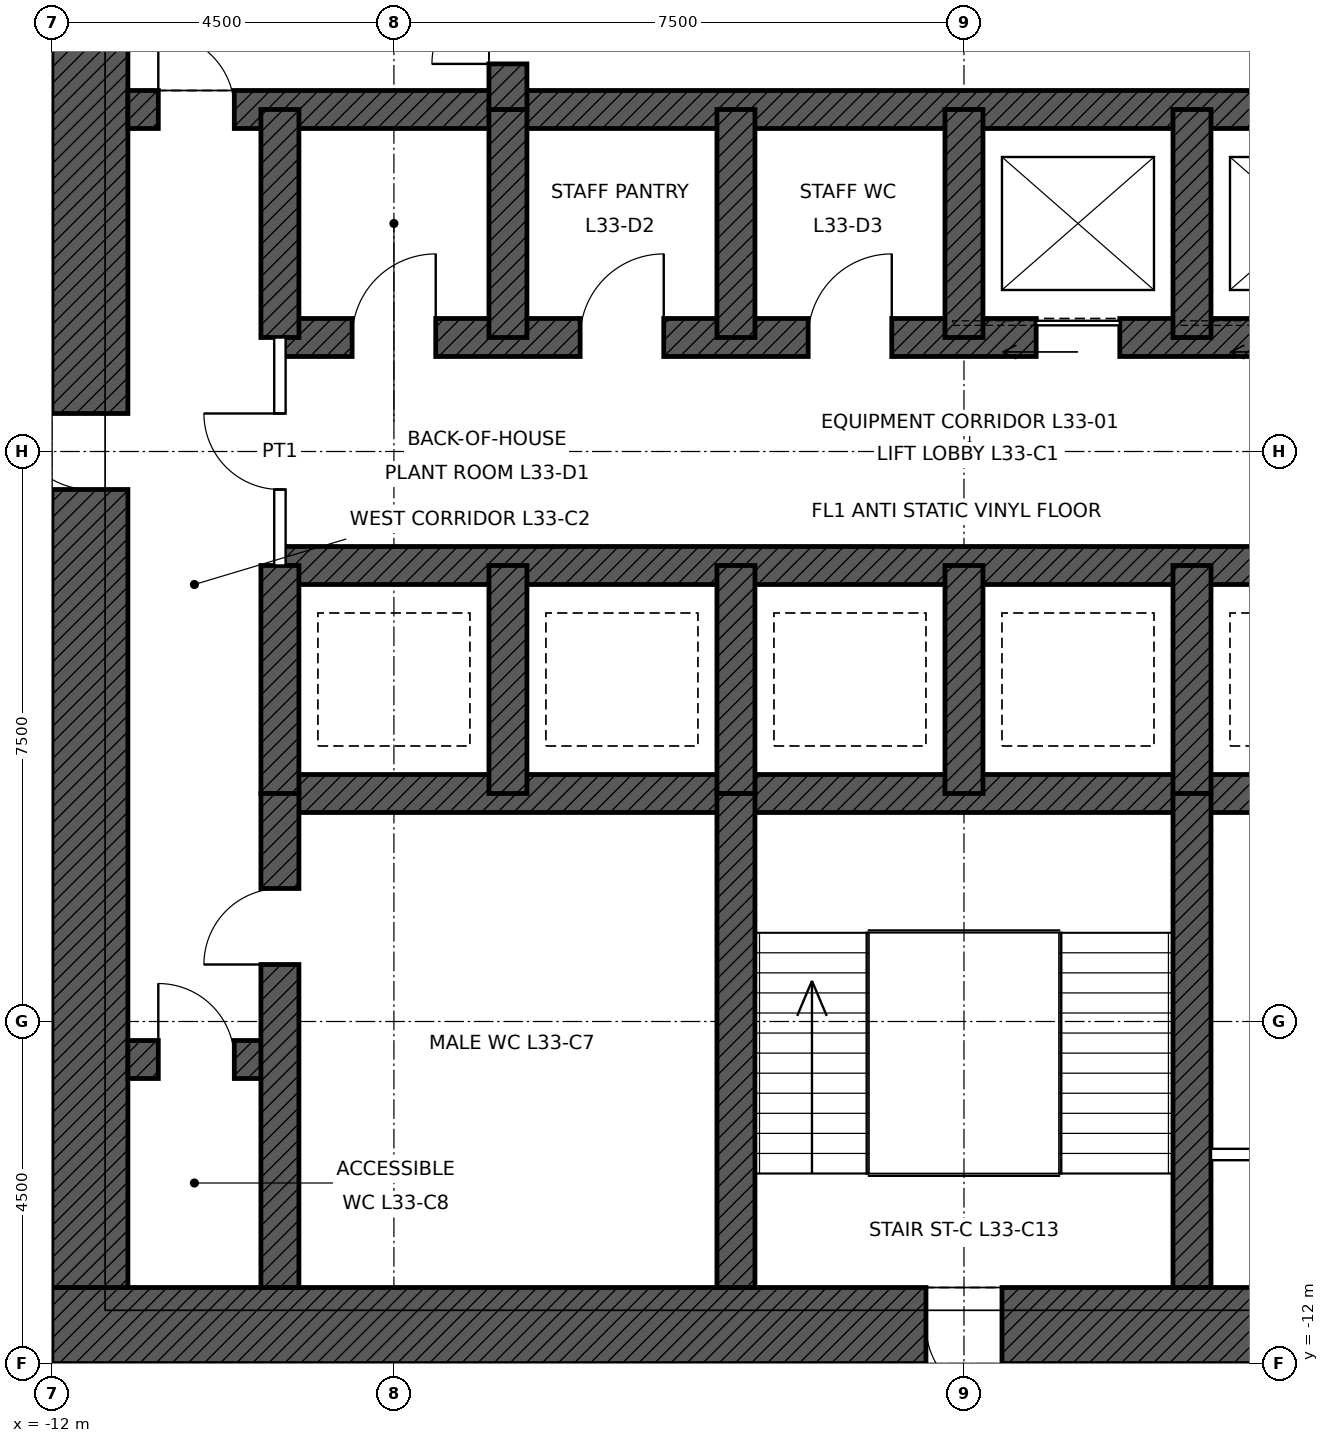
"""IFC4 building model, lengths in metres.
Left out: names, types, materials, properties, quantities, classifications, styles, units other than length and angle.
Written with IfcOpenShell. Run it as: python <this file> out.ifc"""

import sys

from ifc_helpers import new_model, si_unit, direction, frame, frame_2d, origin, place, context, subcontext, project, spatial, rectangle, extrude, element, fill, save


model = new_model("IFC4")
c1 = context("Model", 3, precision=1e-05, world=origin(), true_north=direction((0.0, 1.0)))
c2 = subcontext(c1, "Body", "Model", "MODEL_VIEW")
j1 = project(units=[si_unit("LENGTHUNIT", "METRE"), si_unit("PLANEANGLEUNIT", "RADIAN")], contexts=[c1])
p1 = place(None, origin())
s1 = spatial("IfcSite", under=j1, at=p1, CompositionType="ELEMENT")
p2 = place(p1, origin())
s2 = spatial("IfcBuilding", under=s1, at=p2, CompositionType="ELEMENT")
p3 = place(p2, frame((0.0, 0.0, 162.9)))
s3 = spatial("IfcBuildingStorey", under=s2, at=p3, CompositionType="ELEMENT", Elevation=162.9)
p4 = place(p3, frame((12.0, -11.5, 0.0), z_axis=(0.0, 0.0, 1.0), x_axis=(-1.0, 0.0, 0.0)))
e1 = element("IfcWall", 1, at=p4, inside=s3, PredefinedType="SHEAR", context=c2, shape_type="SweptSolid", body=[
    extrude(rectangle(XDim=24.0, YDim=1.0, at=frame_2d((12.0, 0.0))), origin(), (0.0, 0.0, 1.0), 4.5),
])
p5 = place(p4, frame((11.5, 0.0, 0.0)))
e2 = element("IfcOpeningElement", 2, at=p5, cuts=e1, PredefinedType="OPENING", context=c2, shape_type="SweptSolid", body=[
    extrude(rectangle(XDim=1.0, YDim=2.1, at=frame_2d((0.5, 1.05))), frame((0.0, 0.51, 0.0), z_axis=(0.0, -1.0, 0.0), x_axis=(1.0, 0.0, 0.0)), (0.0, 0.0, 1.0), 1.02),
])
p6 = place(p4, frame((1.0, 0.0, 0.0)))
e3 = element("IfcOpeningElement", 3, at=p6, cuts=e1, PredefinedType="OPENING", context=c2, shape_type="SweptSolid", body=[
    extrude(rectangle(XDim=1.0, YDim=2.4, at=frame_2d((0.5, 1.2))), frame((0.0, 0.51, 0.0), z_axis=(0.0, -1.0, 0.0), x_axis=(1.0, 0.0, 0.0)), (0.0, 0.0, 1.0), 1.02),
])
p7 = place(p3, frame((-11.5, -11.0, 0.0), z_axis=(0.0, 0.0, 1.0), x_axis=(0.0, 1.0, 0.0)))
e4 = element("IfcWall", 4, at=p7, inside=s3, PredefinedType="SHEAR", context=c2, shape_type="SweptSolid", body=[
    extrude(rectangle(XDim=22.0, YDim=1.0, at=frame_2d((11.0, 0.0))), origin(), (0.0, 0.0, 1.0), 4.5),
])
p8 = place(p7, frame((10.5, 0.0, 0.0)))
e5 = element("IfcOpeningElement", 5, at=p8, cuts=e4, PredefinedType="OPENING", context=c2, shape_type="SweptSolid", body=[
    extrude(rectangle(XDim=1.0, YDim=2.4, at=frame_2d((0.5, 1.2))), frame((0.0, 0.51, 0.0), z_axis=(0.0, -1.0, 0.0), x_axis=(1.0, 0.0, 0.0)), (0.0, 0.0, 1.0), 1.02),
])
p9 = place(p3, frame((-11.0, 4.5, 0.0), z_axis=(0.0, 0.0, 1.0), x_axis=(1.0, 0.0, 0.0)))
e6 = element("IfcWall", 6, at=p9, inside=s3, PredefinedType="SHEAR", context=c2, shape_type="SweptSolid", body=[
    extrude(rectangle(XDim=22.0, YDim=0.5, at=frame_2d((11.0, 0.0))), origin(), (0.0, 0.0, 1.0), 4.5),
])
p10 = place(p9, frame((0.4, 0.0, 0.0)))
e7 = element("IfcOpeningElement", 7, at=p10, cuts=e6, PredefinedType="OPENING", context=c2, shape_type="SweptSolid", body=[
    extrude(rectangle(XDim=1.0, YDim=2.1, at=frame_2d((0.5, 1.05))), frame((0.0, 0.26, 0.0), z_axis=(0.0, -1.0, 0.0), x_axis=(1.0, 0.0, 0.0)), (0.0, 0.0, 1.0), 0.52),
])
p11 = place(p9, frame((20.6, 0.0, 0.0)))
e8 = element("IfcOpeningElement", 8, at=p11, cuts=e6, PredefinedType="OPENING", context=c2, shape_type="SweptSolid", body=[
    extrude(rectangle(XDim=1.0, YDim=2.1, at=frame_2d((0.5, 1.05))), frame((0.0, 0.26, 0.0), z_axis=(0.0, -1.0, 0.0), x_axis=(1.0, 0.0, 0.0)), (0.0, 0.0, 1.0), 0.52),
])
p12 = place(p3, frame((-9.0, 1.5, 0.0), z_axis=(0.0, 0.0, 1.0), x_axis=(1.0, 0.0, 0.0)))
e9 = element("IfcWall", 9, at=p12, inside=s3, PredefinedType="SHEAR", context=c2, shape_type="SweptSolid", body=[
    extrude(rectangle(XDim=18.0, YDim=0.5, at=frame_2d((9.0, 0.0))), origin(), (0.0, 0.0, 1.0), 4.5),
])
p13 = place(p12, frame((9.95, 0.0, 0.0)))
e10 = element("IfcOpeningElement", 10, at=p13, cuts=e9, PredefinedType="OPENING", context=c2, shape_type="SweptSolid", body=[
    extrude(rectangle(XDim=1.1, YDim=2.1, at=frame_2d((0.55, 1.05))), frame((0.0, 0.26, 0.0), z_axis=(0.0, -1.0, 0.0), x_axis=(1.0, 0.0, 0.0)), (0.0, 0.0, 1.0), 0.52),
])
p14 = place(p12, frame((12.95, 0.0, 0.0)))
e11 = element("IfcOpeningElement", 11, at=p14, cuts=e9, PredefinedType="OPENING", context=c2, shape_type="SweptSolid", body=[
    extrude(rectangle(XDim=1.1, YDim=2.1, at=frame_2d((0.55, 1.05))), frame((0.0, 0.26, 0.0), z_axis=(0.0, -1.0, 0.0), x_axis=(1.0, 0.0, 0.0)), (0.0, 0.0, 1.0), 0.52),
])
p15 = place(p12, frame((15.95, 0.0, 0.0)))
e12 = element("IfcOpeningElement", 12, at=p15, cuts=e9, PredefinedType="OPENING", context=c2, shape_type="SweptSolid", body=[
    extrude(rectangle(XDim=1.1, YDim=2.1, at=frame_2d((0.55, 1.05))), frame((0.0, 0.26, 0.0), z_axis=(0.0, -1.0, 0.0), x_axis=(1.0, 0.0, 0.0)), (0.0, 0.0, 1.0), 0.52),
])
p16 = place(p12, frame((0.95, 0.0, 0.0)))
e13 = element("IfcOpeningElement", 13, at=p16, cuts=e9, PredefinedType="OPENING", context=c2, shape_type="SweptSolid", body=[
    extrude(rectangle(XDim=1.1, YDim=2.1, at=frame_2d((0.55, 1.05))), frame((0.0, 0.26, 0.0), z_axis=(0.0, -1.0, 0.0), x_axis=(1.0, 0.0, 0.0)), (0.0, 0.0, 1.0), 0.52),
])
p17 = place(p12, frame((3.95, 0.0, 0.0)))
e14 = element("IfcOpeningElement", 14, at=p17, cuts=e9, PredefinedType="OPENING", context=c2, shape_type="SweptSolid", body=[
    extrude(rectangle(XDim=1.1, YDim=2.1, at=frame_2d((0.55, 1.05))), frame((0.0, 0.26, 0.0), z_axis=(0.0, -1.0, 0.0), x_axis=(1.0, 0.0, 0.0)), (0.0, 0.0, 1.0), 0.52),
])
p18 = place(p12, frame((6.95, 0.0, 0.0)))
e15 = element("IfcOpeningElement", 15, at=p18, cuts=e9, PredefinedType="OPENING", context=c2, shape_type="SweptSolid", body=[
    extrude(rectangle(XDim=1.1, YDim=2.1, at=frame_2d((0.55, 1.05))), frame((0.0, 0.26, 0.0), z_axis=(0.0, -1.0, 0.0), x_axis=(1.0, 0.0, 0.0)), (0.0, 0.0, 1.0), 0.52),
])
for number, where, z_axis, x_axis in (
    (16, (-9.0, -1.5, 0.0), (0.0, 0.0, 1.0), (1.0, 0.0, 0.0)),
    (17, (-9.0, -4.5, 0.0), (0.0, 0.0, 1.0), (1.0, 0.0, 0.0)),
):
    element("IfcWall", number, at=place(p3, frame(where, z_axis=z_axis, x_axis=x_axis)), inside=s3, PredefinedType="SHEAR", context=c2, shape_type="SweptSolid", body=[
        extrude(rectangle(XDim=18.0, YDim=0.5, at=frame_2d((9.0, 0.0))), origin(), (0.0, 0.0, 1.0), 4.5),
    ])
p19 = place(p3, frame((-11.0, -8.0, 0.0), z_axis=(0.0, 0.0, 1.0), x_axis=(1.0, 0.0, 0.0)))
e18 = element("IfcWall", 18, at=p19, inside=s3, PredefinedType="SHEAR", context=c2, shape_type="SweptSolid", body=[
    extrude(rectangle(XDim=2.0, YDim=0.5, at=frame_2d((1.0, 0.0))), origin(), (0.0, 0.0, 1.0), 4.5),
])
p20 = place(p19, frame((0.4, 0.0, 0.0)))
e19 = element("IfcOpeningElement", 19, at=p20, cuts=e18, PredefinedType="OPENING", context=c2, shape_type="SweptSolid", body=[
    extrude(rectangle(XDim=1.0, YDim=2.1, at=frame_2d((0.5, 1.05))), frame((0.0, 0.26, 0.0), z_axis=(0.0, -1.0, 0.0), x_axis=(1.0, 0.0, 0.0)), (0.0, 0.0, 1.0), 0.52),
])
for number, where, z_axis, x_axis in (
    (20, (-9.0, 1.5, 0.0), (0.0, 0.0, 1.0), (0.0, 1.0, 0.0)),
    (21, (-9.0, -4.5, 0.0), (0.0, 0.0, 1.0), (0.0, 1.0, 0.0)),
    (22, (-6.0, 1.5, 0.0), (0.0, 0.0, 1.0), (0.0, 1.0, 0.0)),
    (23, (-3.0, 1.5, 0.0), (0.0, 0.0, 1.0), (0.0, 1.0, 0.0)),
    (24, (0.0, 1.5, 0.0), (0.0, 0.0, 1.0), (0.0, 1.0, 0.0)),
    (25, (3.0, 1.5, 0.0), (0.0, 0.0, 1.0), (0.0, 1.0, 0.0)),
    (26, (-6.0, -4.5, 0.0), (0.0, 0.0, 1.0), (0.0, 1.0, 0.0)),
    (27, (-3.0, -4.5, 0.0), (0.0, 0.0, 1.0), (0.0, 1.0, 0.0)),
    (28, (0.0, -4.5, 0.0), (0.0, 0.0, 1.0), (0.0, 1.0, 0.0)),
    (29, (3.0, -4.5, 0.0), (0.0, 0.0, 1.0), (0.0, 1.0, 0.0)),
):
    element("IfcWall", number, at=place(p3, frame(where, z_axis=z_axis, x_axis=x_axis)), inside=s3, PredefinedType="SHEAR", context=c2, shape_type="SweptSolid", body=[
        extrude(rectangle(XDim=3.0, YDim=0.5, at=frame_2d((1.5, 0.0))), origin(), (0.0, 0.0, 1.0), 4.5),
    ])
p21 = place(p3, frame((-6.0, 4.5, 0.0), z_axis=(0.0, 0.0, 1.0), x_axis=(0.0, 1.0, 0.0)))
e30 = element("IfcWall", 30, at=p21, inside=s3, PredefinedType="SHEAR", context=c2, shape_type="SweptSolid", body=[
    extrude(rectangle(XDim=6.5, YDim=0.5, at=frame_2d((3.25, 0.0))), origin(), (0.0, 0.0, 1.0), 4.5),
])
p22 = place(p21, frame((0.6, 0.0, 0.0)))
e31 = element("IfcOpeningElement", 31, at=p22, cuts=e30, PredefinedType="OPENING", context=c2, shape_type="SweptSolid", body=[
    extrude(rectangle(XDim=1.0, YDim=2.1, at=frame_2d((0.5, 1.05))), frame((0.0, 0.26, 0.0), z_axis=(0.0, -1.0, 0.0), x_axis=(1.0, 0.0, 0.0)), (0.0, 0.0, 1.0), 0.52),
])
p23 = place(p3, frame((-9.0, -11.0, 0.0), z_axis=(0.0, 0.0, 1.0), x_axis=(0.0, 1.0, 0.0)))
e32 = element("IfcWall", 32, at=p23, inside=s3, PredefinedType="SHEAR", context=c2, shape_type="SweptSolid", body=[
    extrude(rectangle(XDim=6.5, YDim=0.5, at=frame_2d((3.25, 0.0))), origin(), (0.0, 0.0, 1.0), 4.5),
])
p24 = place(p23, frame((4.25, 0.0, 0.0)))
e33 = element("IfcOpeningElement", 33, at=p24, cuts=e32, PredefinedType="OPENING", context=c2, shape_type="SweptSolid", body=[
    extrude(rectangle(XDim=1.0, YDim=2.1, at=frame_2d((0.5, 1.05))), frame((0.0, 0.26, 0.0), z_axis=(0.0, -1.0, 0.0), x_axis=(1.0, 0.0, 0.0)), (0.0, 0.0, 1.0), 0.52),
])
for number, where, z_axis, x_axis in (
    (34, (-3.0, -11.0, 0.0), (0.0, 0.0, 1.0), (0.0, 1.0, 0.0)),
    (35, (3.0, -11.0, 0.0), (0.0, 0.0, 1.0), (0.0, 1.0, 0.0)),
):
    element("IfcWall", number, at=place(p3, frame(where, z_axis=z_axis, x_axis=x_axis)), inside=s3, PredefinedType="SHEAR", context=c2, shape_type="SweptSolid", body=[
        extrude(rectangle(XDim=6.5, YDim=0.5, at=frame_2d((3.25, 0.0))), origin(), (0.0, 0.0, 1.0), 4.5),
    ])
p25 = place(p3, frame((3.25, -9.25, 0.0), z_axis=(0.0, 0.0, 1.0), x_axis=(1.0, 0.0, 0.0)))
e36 = element("IfcWall", 36, at=p25, inside=s3, PredefinedType="PARTITIONING", context=c2, shape_type="SweptSolid", body=[
    extrude(rectangle(XDim=5.5, YDim=0.15, at=frame_2d((2.75, 0.0))), origin(), (0.0, 0.0, 1.0), 4.25),
])
p26 = place(p25, frame((2.25, 0.0, 0.0)))
e37 = element("IfcOpeningElement", 37, at=p26, cuts=e36, PredefinedType="OPENING", context=c2, shape_type="SweptSolid", body=[
    extrude(rectangle(XDim=1.0, YDim=2.1, at=frame_2d((0.5, 1.05))), frame((0.0, 0.085, 0.0), z_axis=(0.0, -1.0, 0.0), x_axis=(1.0, 0.0, 0.0)), (0.0, 0.0, 1.0), 0.17),
])
p27 = place(p3, frame((-9.0, -1.5, 0.0), z_axis=(0.0, 0.0, 1.0), x_axis=(0.0, 1.0, 0.0)))
e38 = element("IfcWall", 38, at=p27, inside=s3, PredefinedType="PARTITIONING", context=c2, shape_type="SweptSolid", body=[
    extrude(rectangle(XDim=3.0, YDim=0.15, at=frame_2d((1.5, 0.0))), origin(), (0.0, 0.0, 1.0), 4.25),
])
p28 = place(p27, frame((1.0, 0.0, 0.0)))
e39 = element("IfcOpeningElement", 39, at=p28, cuts=e38, PredefinedType="OPENING", context=c2, shape_type="SweptSolid", body=[
    extrude(rectangle(XDim=1.0, YDim=2.4, at=frame_2d((0.5, 1.2))), frame((0.0, 0.085, 0.0), z_axis=(0.0, -1.0, 0.0), x_axis=(1.0, 0.0, 0.0)), (0.0, 0.0, 1.0), 0.17),
])
p29 = place(p10, origin())
e40 = element("IfcDoor", 40, at=p29, inside=s3, OperationType="SINGLE_SWING_LEFT", PredefinedType="DOOR", context=c2, shape_type="SweptSolid", body=[
    extrude(rectangle(XDim=1.0, YDim=2.1, at=frame_2d((0.5, 1.05))), frame((0.0, 0.025, 0.0), z_axis=(0.0, -1.0, 0.0), x_axis=(1.0, 0.0, 0.0)), (0.0, 0.0, 1.0), 0.05),
])
fill(e7, e40)
p30 = place(p22, origin())
e41 = element("IfcDoor", 41, at=p30, inside=s3, OperationType="SINGLE_SWING_LEFT", PredefinedType="DOOR", context=c2, shape_type="SweptSolid", body=[
    extrude(rectangle(XDim=1.0, YDim=2.1, at=frame_2d((0.5, 1.05))), frame((0.0, 0.025, 0.0), z_axis=(0.0, -1.0, 0.0), x_axis=(1.0, 0.0, 0.0)), (0.0, 0.0, 1.0), 0.05),
])
fill(e31, e41)
p31 = place(p5, origin())
e42 = element("IfcDoor", 42, at=p31, inside=s3, OperationType="SINGLE_SWING_LEFT", PredefinedType="DOOR", context=c2, shape_type="SweptSolid", body=[
    extrude(rectangle(XDim=1.0, YDim=2.1, at=frame_2d((0.5, 1.05))), frame((0.0, 0.485, 0.0), z_axis=(0.0, -1.0, 0.0), x_axis=(1.0, 0.0, 0.0)), (0.0, 0.0, 1.0), 0.05),
])
fill(e2, e42)
p32 = place(p8, origin())
e43 = element("IfcDoor", 43, at=p32, inside=s3, OperationType="SINGLE_SWING_RIGHT", PredefinedType="DOOR", context=c2, shape_type="SweptSolid", body=[
    extrude(rectangle(XDim=1.0, YDim=2.4, at=frame_2d((0.5, 1.2))), frame((0.0, 0.485, 0.0), z_axis=(0.0, -1.0, 0.0), x_axis=(1.0, 0.0, 0.0)), (0.0, 0.0, 1.0), 0.05),
])
fill(e5, e43)
p33 = place(p24, origin())
e44 = element("IfcDoor", 44, at=p33, inside=s3, OperationType="SINGLE_SWING_LEFT", PredefinedType="DOOR", context=c2, shape_type="SweptSolid", body=[
    extrude(rectangle(XDim=1.0, YDim=2.1, at=frame_2d((0.5, 1.05))), frame((0.0, 0.025, 0.0), z_axis=(0.0, -1.0, 0.0), x_axis=(1.0, 0.0, 0.0)), (0.0, 0.0, 1.0), 0.05),
])
fill(e33, e44)
p34 = place(p20, origin())
e45 = element("IfcDoor", 45, at=p34, inside=s3, OperationType="SINGLE_SWING_LEFT", PredefinedType="DOOR", context=c2, shape_type="SweptSolid", body=[
    extrude(rectangle(XDim=1.0, YDim=2.1, at=frame_2d((0.5, 1.05))), frame((0.0, 0.025, 0.0), z_axis=(0.0, -1.0, 0.0), x_axis=(1.0, 0.0, 0.0)), (0.0, 0.0, 1.0), 0.05),
])
fill(e19, e45)
p35 = place(p13, origin())
e46 = element("IfcDoor", 46, at=p35, inside=s3, OperationType="SLIDING_TO_LEFT", PredefinedType="DOOR", context=c2, shape_type="SweptSolid", body=[
    extrude(rectangle(XDim=1.1, YDim=2.1, at=frame_2d((0.55, 1.05))), frame((0.0, 0.025, 0.0), z_axis=(0.0, -1.0, 0.0), x_axis=(1.0, 0.0, 0.0)), (0.0, 0.0, 1.0), 0.05),
])
fill(e10, e46)
p36 = place(p28, origin())
e47 = element("IfcDoor", 47, at=p36, inside=s3, OperationType="SINGLE_SWING_RIGHT", PredefinedType="DOOR", context=c2, shape_type="SweptSolid", body=[
    extrude(rectangle(XDim=1.0, YDim=2.4, at=frame_2d((0.5, 1.2))), frame((0.0, 0.025, 0.0), z_axis=(0.0, -1.0, 0.0), x_axis=(1.0, 0.0, 0.0)), (0.0, 0.0, 1.0), 0.05),
])
fill(e39, e47)
p37 = place(p16, origin())
e48 = element("IfcDoor", 48, at=p37, inside=s3, OperationType="SINGLE_SWING_RIGHT", PredefinedType="DOOR", context=c2, shape_type="SweptSolid", body=[
    extrude(rectangle(XDim=1.1, YDim=2.1, at=frame_2d((0.55, 1.05))), frame((0.0, 0.025, 0.0), z_axis=(0.0, -1.0, 0.0), x_axis=(1.0, 0.0, 0.0)), (0.0, 0.0, 1.0), 0.05),
])
fill(e13, e48)
p38 = place(p17, origin())
e49 = element("IfcDoor", 49, at=p38, inside=s3, OperationType="SINGLE_SWING_RIGHT", PredefinedType="DOOR", context=c2, shape_type="SweptSolid", body=[
    extrude(rectangle(XDim=1.1, YDim=2.1, at=frame_2d((0.55, 1.05))), frame((0.0, 0.025, 0.0), z_axis=(0.0, -1.0, 0.0), x_axis=(1.0, 0.0, 0.0)), (0.0, 0.0, 1.0), 0.05),
])
fill(e14, e49)
p39 = place(p18, origin())
e50 = element("IfcDoor", 50, at=p39, inside=s3, OperationType="SINGLE_SWING_RIGHT", PredefinedType="DOOR", context=c2, shape_type="SweptSolid", body=[
    extrude(rectangle(XDim=1.1, YDim=2.1, at=frame_2d((0.55, 1.05))), frame((0.0, 0.025, 0.0), z_axis=(0.0, -1.0, 0.0), x_axis=(1.0, 0.0, 0.0)), (0.0, 0.0, 1.0), 0.05),
])
fill(e15, e50)
save(model, sys.argv[1])
